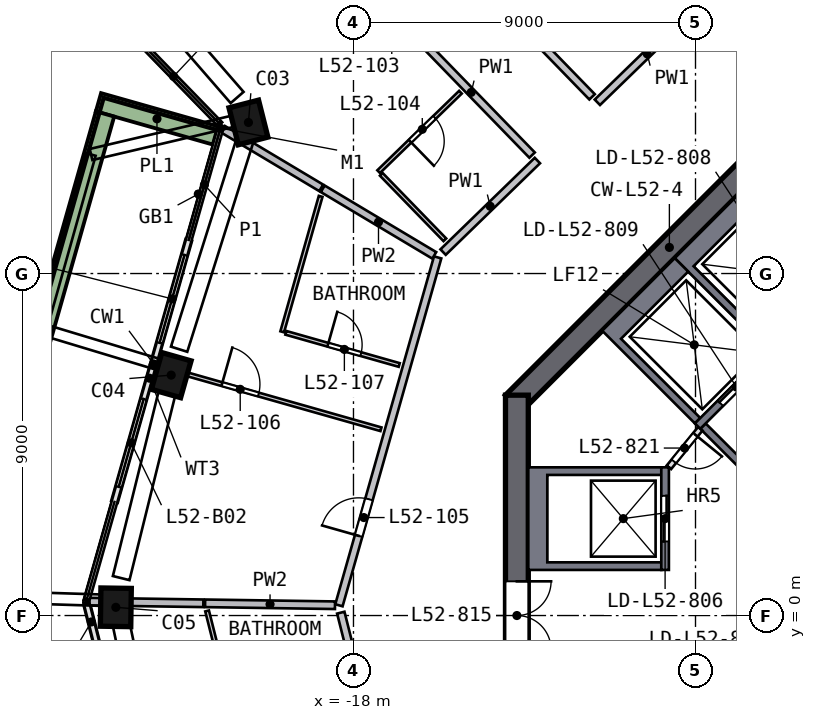
"""IFC4 building model, lengths in metres.
Left out: names, types, materials, properties, quantities, classifications, styles, units other than length and angle.
Written with IfcOpenShell. Run it as: python <this file> out.ifc"""

import sys

from ifc_helpers import new_model, si_unit, direction, frame, frame_2d, origin, origin_2d, place, context, subcontext, project, spatial, polyline, rectangle, outline, extrude, element, fill, save


model = new_model("IFC4")
c1 = context("Model", 3, precision=1e-05, world=origin(), true_north=direction((0.0, 1.0)))
c2 = subcontext(c1, "Body", "Model", "MODEL_VIEW")
j1 = project(units=[si_unit("LENGTHUNIT", "METRE"), si_unit("PLANEANGLEUNIT", "RADIAN")], contexts=[c1])
p1 = place(None, origin())
s1 = spatial("IfcSite", under=j1, at=p1, CompositionType="ELEMENT")
p2 = place(p1, origin())
s2 = spatial("IfcBuilding", under=s1, at=p2, CompositionType="ELEMENT")
p3 = place(p2, frame((0.0, 0.0, 212.5)))
s3 = spatial("IfcBuildingStorey", under=s2, at=p3, CompositionType="ELEMENT", Elevation=212.5)
p4 = place(p3, frame((-20.69, 13.095, 0.0), z_axis=(-0.061428163, -0.098931673, 0.993196408), x_axis=(-0.250648432, 0.964717679, 0.080592581)))
e1 = element("IfcColumn", 1, at=p4, inside=s3, PredefinedType="COLUMN", context=c2, shape_type="SweptSolid", body=[
    extrude(rectangle(XDim=1.0, YDim=0.8, at=origin_2d()), origin(), (0.0, 0.0, 1.0), 3.021),
])
p5 = place(p3, frame((-22.76, 6.458, 0.0), z_axis=(-0.029838507, -0.108518363, 0.993646531), x_axis=(-0.271559126, -0.955819005, -0.112541864)))
e2 = element("IfcColumn", 2, at=p5, inside=s3, PredefinedType="COLUMN", context=c2, shape_type="SweptSolid", body=[
    extrude(rectangle(XDim=1.0, YDim=0.8, at=origin_2d()), origin(), (0.0, 0.0, 1.0), 3.019),
])
p6 = place(p3, frame((-24.252, 0.356, 0.0), z_axis=(-0.000727532, -0.115354293, 0.993324145), x_axis=(0.014697649, 0.993215879, 0.115352485)))
e3 = element("IfcColumn", 3, at=p6, inside=s3, PredefinedType="COLUMN", context=c2, shape_type="SweptSolid", body=[
    extrude(rectangle(XDim=1.0, YDim=0.8, at=origin_2d()), origin(), (0.0, 0.0, 1.0), 3.02),
])
p7 = place(p3, frame((-5.587, 13.788, 0.0), z_axis=(0.0, 0.0, 1.0), x_axis=(-0.707106781, -0.707106781, 0.0)))
e4 = element("IfcWall", 4, at=p7, inside=s3, PredefinedType="SHEAR", context=c2, shape_type="SweptSolid", body=[
    extrude(rectangle(XDim=11.598, YDim=0.6, at=frame_2d((5.799, 0.0))), origin(), (0.0, 0.0, 1.0), 3.5),
])
p8 = place(p3, frame((-13.7, 5.799, 0.0), z_axis=(0.0, 0.0, 1.0), x_axis=(0.0, -1.0, 0.0)))
e5 = element("IfcWall", 5, at=p8, inside=s3, PredefinedType="SHEAR", context=c2, shape_type="SweptSolid", body=[
    extrude(rectangle(XDim=11.598, YDim=0.6, at=frame_2d((5.799, 0.0))), origin(), (0.0, 0.0, 1.0), 3.5),
])
p9 = place(p8, frame((4.899, 0.0, 0.0)))
e6 = element("IfcOpeningElement", 6, at=p9, cuts=e5, PredefinedType="OPENING", context=c2, shape_type="SweptSolid", body=[
    extrude(rectangle(XDim=1.8, YDim=2.1, at=frame_2d((0.9, 1.05))), frame((0.0, 0.31, 0.0), z_axis=(0.0, -1.0, 0.0), x_axis=(1.0, 0.0, 0.0)), (0.0, 0.0, 1.0), 0.62),
])
p10 = place(p3, frame((-22.337, 9.872, 0.0), z_axis=(0.0, 0.0, 1.0), x_axis=(-0.272994706, -0.962015536, 0.0)))
e7 = element("IfcWall", 7, at=p10, inside=s3, PredefinedType="SOLIDWALL", context=c2, shape_type="SweptSolid", body=[
    extrude(rectangle(XDim=3.4, YDim=0.15, at=frame_2d((1.7, 0.0))), origin(), (0.0, 0.0, 1.0), 2.935),
])
p11 = place(p10, frame((0.4, 0.0, 0.0)))
e8 = element("IfcOpeningElement", 8, at=p11, cuts=e7, PredefinedType="OPENING", context=c2, shape_type="SweptSolid", body=[
    extrude(rectangle(XDim=2.4, YDim=2.4, at=frame_2d((1.2, 1.2))), frame((0.0, 0.085, 0.0), z_axis=(0.0, -1.0, 0.0), x_axis=(1.0, 0.0, 0.0)), (0.0, 0.0, 1.0), 0.17),
])
p12 = place(p3, frame((-23.265, 6.601, 0.0), z_axis=(0.0, 0.0, 1.0), x_axis=(-0.272953064, -0.962027351, 0.0)))
e9 = element("IfcWall", 9, at=p12, inside=s3, PredefinedType="SOLIDWALL", context=c2, shape_type="SweptSolid", body=[
    extrude(rectangle(XDim=3.74, YDim=0.15, at=frame_2d((1.87, 0.0))), origin(), (0.0, 0.0, 1.0), 2.935),
])
p13 = place(p12, frame((0.94, 0.0, 0.0)))
e10 = element("IfcOpeningElement", 10, at=p13, cuts=e9, PredefinedType="OPENING", context=c2, shape_type="SweptSolid", body=[
    extrude(rectangle(XDim=2.4, YDim=2.4, at=frame_2d((1.2, 1.2))), frame((0.0, 0.085, 0.0), z_axis=(0.0, -1.0, 0.0), x_axis=(1.0, 0.0, 0.0)), (0.0, 0.0, 1.0), 0.17),
])
p14 = place(p3, frame((-25.014, 0.289, 0.0), z_axis=(0.0, 0.0, 1.0), x_axis=(0.244646014, -0.969612463, 0.0)))
e11 = element("IfcWall", 11, at=p14, inside=s3, PredefinedType="SOLIDWALL", context=c2, shape_type="SweptSolid", body=[
    extrude(rectangle(XDim=3.946, YDim=0.15, at=frame_2d((1.973, 0.0))), origin(), (0.0, 0.0, 1.0), 2.935),
])
p15 = place(p14, frame((1.146, 0.0, 0.0)))
e12 = element("IfcOpeningElement", 12, at=p15, cuts=e11, PredefinedType="OPENING", context=c2, shape_type="SweptSolid", body=[
    extrude(rectangle(XDim=2.4, YDim=2.4, at=frame_2d((1.2, 1.2))), frame((0.0, 0.085, 0.0), z_axis=(0.0, -1.0, 0.0), x_axis=(1.0, 0.0, 0.0)), (0.0, 0.0, 1.0), 0.17),
])
p16 = place(p3, frame((-21.632, 12.634, 0.0), z_axis=(0.0, 0.0, 1.0), x_axis=(-0.962020571, 0.272976962, 0.0)))
e13 = element("IfcWall", 13, at=p16, inside=s3, PredefinedType="SOLIDWALL", context=c2, shape_type="SweptSolid", body=[
    extrude(rectangle(XDim=3.199, YDim=0.5, at=frame_2d((1.6, 0.0))), origin(), (0.0, 0.0, 1.0), 0.7),
])
p17 = place(p3, frame((-24.537, 13.199, 0.0), z_axis=(0.0, 0.0, 1.0), x_axis=(-0.272950348, -0.962028122, 0.0)))
e14 = element("IfcWall", 14, at=p17, inside=s3, PredefinedType="SOLIDWALL", context=c2, shape_type="SweptSolid", body=[
    extrude(rectangle(XDim=13.224, YDim=0.5, at=frame_2d((6.612, 0.0))), origin(), (0.0, 0.0, 1.0), 0.7),
])
p18 = place(p3, frame((-28.149, 0.348, 0.0), z_axis=(0.0, 0.0, 1.0), x_axis=(0.244632202, -0.969615948, 0.0)))
e15 = element("IfcWall", 15, at=p18, inside=s3, PredefinedType="SOLIDWALL", context=c2, shape_type="SweptSolid", body=[
    extrude(rectangle(XDim=13.723, YDim=0.5, at=frame_2d((6.862, 0.0))), origin(), (0.0, 0.0, 1.0), 0.7),
])
p19 = place(p3, origin())
e16 = element("IfcWall", 16, at=p19, inside=s3, PredefinedType="SOLIDWALL", context=c2, shape_type="SweptSolid", body=[
    extrude(outline(polyline([(-13.4, 3.9), (-9.9, 3.9), (-9.9, 3.7), (-12.9, 3.7), (-12.9, 1.4), (-9.9, 1.4), (-9.9, 1.2), (-13.4, 1.2), (-13.4, 3.9)])), origin(), (0.0, 0.0, 1.0), 3.0),
])
p20 = place(p3, frame((-9.8, 1.2, 0.0), z_axis=(0.0, 0.0, 1.0), x_axis=(0.0, 1.0, 0.0)))
e17 = element("IfcWall", 17, at=p20, inside=s3, PredefinedType="SOLIDWALL", context=c2, shape_type="SweptSolid", body=[
    extrude(rectangle(XDim=2.7, YDim=0.2, at=frame_2d((1.35, 0.0))), origin(), (0.0, 0.0, 1.0), 3.0),
])
p21 = place(p20, frame((0.75, 0.0, 0.0)))
e18 = element("IfcOpeningElement", 18, at=p21, cuts=e17, PredefinedType="OPENING", context=c2, shape_type="SweptSolid", body=[
    extrude(rectangle(XDim=1.2, YDim=2.1, at=frame_2d((0.6, 1.05))), frame((0.0, 0.11, 0.0), z_axis=(0.0, -1.0, 0.0), x_axis=(1.0, 0.0, 0.0)), (0.0, 0.0, 1.0), 0.22),
])
p22 = place(p3, origin())
e19 = element("IfcWall", 19, at=p22, inside=s3, PredefinedType="SOLIDWALL", context=c2, shape_type="SweptSolid", body=[
    extrude(outline(polyline([(-9.546, 9.405), (-7.495, 11.455), (-5.056, 9.016), (-5.197, 8.874), (-7.283, 10.96), (-9.051, 9.192), (-6.965, 7.106), (-7.106, 6.965), (-9.546, 9.405)])), origin(), (0.0, 0.0, 1.0), 3.0),
])
p23 = place(p3, origin())
e20 = element("IfcWall", 20, at=p23, inside=s3, PredefinedType="SOLIDWALL", context=c2, shape_type="SweptSolid", body=[
    extrude(outline(polyline([(-11.455, 7.495), (-9.546, 9.405), (-9.192, 9.051), (-10.96, 7.283), (-8.874, 5.197), (-9.016, 5.056), (-11.455, 7.495)])), origin(), (0.0, 0.0, 1.0), 3.0),
])
p24 = place(p3, frame((-7.036, 6.894, 0.0), z_axis=(0.0, 0.0, 1.0), x_axis=(-0.707106781, -0.707106781, 0.0)))
e21 = element("IfcWall", 21, at=p24, inside=s3, PredefinedType="SOLIDWALL", context=c2, shape_type="SweptSolid", body=[
    extrude(rectangle(XDim=2.7, YDim=0.2, at=frame_2d((1.35, 0.0))), origin(), (0.0, 0.0, 1.0), 3.0),
])
p25 = place(p24, frame((0.65, 0.0, 0.0)))
e22 = element("IfcOpeningElement", 22, at=p25, cuts=e21, PredefinedType="OPENING", context=c2, shape_type="SweptSolid", body=[
    extrude(rectangle(XDim=1.2, YDim=2.1, at=frame_2d((0.6, 1.05))), frame((0.0, 0.11, 0.0), z_axis=(0.0, -1.0, 0.0), x_axis=(1.0, 0.0, 0.0)), (0.0, 0.0, 1.0), 0.22),
])
p26 = place(p3, frame((-6.823, 3.005, 0.0), z_axis=(0.0, 0.0, 1.0), x_axis=(-0.707106781, 0.707106781, 0.0)))
e23 = element("IfcWall", 23, at=p26, inside=s3, PredefinedType="SOLIDWALL", context=c2, shape_type="SweptSolid", body=[
    extrude(rectangle(XDim=2.8, YDim=0.2, at=frame_2d((1.4, 0.0))), origin(), (0.0, 0.0, 1.0), 3.0),
])
p27 = place(p3, frame((-8.874, 4.914, 0.0), z_axis=(0.0, 0.0, 1.0), x_axis=(-0.631274009, -0.775559878, 0.0)))
e24 = element("IfcWall", 24, at=p27, inside=s3, PredefinedType="PARTITIONING", context=c2, shape_type="SweptSolid", body=[
    extrude(rectangle(XDim=1.308, YDim=0.15, at=frame_2d((0.654, 0.0))), origin(), (0.0, 0.0, 1.0), 3.0),
])
p28 = place(p27, frame((0.204, 0.0, 0.0)))
e25 = element("IfcOpeningElement", 25, at=p28, cuts=e24, PredefinedType="OPENING", context=c2, shape_type="SweptSolid", body=[
    extrude(rectangle(XDim=0.9, YDim=2.1, at=frame_2d((0.45, 1.05))), frame((0.0, 0.085, 0.0), z_axis=(0.0, -1.0, 0.0), x_axis=(1.0, 0.0, 0.0)), (0.0, 0.0, 1.0), 0.17),
])
p29 = place(p3, frame((-16.055, -8.958, 0.0), z_axis=(0.0, 0.0, 1.0), x_axis=(-0.244643731, 0.969613039, 0.0)))
e26 = element("IfcWall", 26, at=p29, inside=s3, PredefinedType="SOLIDWALL", context=c2, shape_type="SweptSolid", body=[
    extrude(rectangle(XDim=9.317, YDim=0.2, at=frame_2d((4.658, 0.0))), origin(), (0.0, 0.0, 1.0), 3.0),
])
p30 = place(p29, frame((1.9, 0.0, 0.0)))
e27 = element("IfcOpeningElement", 27, at=p30, cuts=e26, PredefinedType="OPENING", context=c2, shape_type="SweptSolid", body=[
    extrude(rectangle(XDim=1.0, YDim=2.1, at=frame_2d((0.5, 1.05))), frame((0.0, 0.11, 0.0), z_axis=(0.0, -1.0, 0.0), x_axis=(1.0, 0.0, 0.0)), (0.0, 0.0, 1.0), 0.22),
])
p31 = place(p3, frame((-18.383, 0.27, 0.0), z_axis=(0.0, 0.0, 1.0), x_axis=(0.272958768, 0.962025733, 0.0)))
e28 = element("IfcWall", 28, at=p31, inside=s3, PredefinedType="SOLIDWALL", context=c2, shape_type="SweptSolid", body=[
    extrude(rectangle(XDim=9.517, YDim=0.2, at=frame_2d((4.758, 0.0))), origin(), (0.0, 0.0, 1.0), 3.0),
])
p32 = place(p31, frame((1.9, 0.0, 0.0)))
e29 = element("IfcOpeningElement", 29, at=p32, cuts=e28, PredefinedType="OPENING", context=c2, shape_type="SweptSolid", body=[
    extrude(rectangle(XDim=1.0, YDim=2.1, at=frame_2d((0.5, 1.05))), frame((0.0, 0.11, 0.0), z_axis=(0.0, -1.0, 0.0), x_axis=(1.0, 0.0, 0.0)), (0.0, 0.0, 1.0), 0.22),
])
p33 = place(p3, frame((-13.3, 12.117, 0.0), z_axis=(0.0, 0.0, 1.0), x_axis=(-0.696664352, 0.717397226, 0.0)))
e30 = element("IfcWall", 30, at=p33, inside=s3, PredefinedType="SOLIDWALL", context=c2, shape_type="SweptSolid", body=[
    extrude(rectangle(XDim=9.821, YDim=0.2, at=frame_2d((4.91, 0.0))), origin(), (0.0, 0.0, 1.0), 3.0),
])
p34 = place(p33, frame((4.8, 0.0, 0.0)))
e31 = element("IfcOpeningElement", 31, at=p34, cuts=e30, PredefinedType="OPENING", context=c2, shape_type="SweptSolid", body=[
    extrude(rectangle(XDim=1.0, YDim=2.1, at=frame_2d((0.5, 1.05))), frame((0.0, 0.11, 0.0), z_axis=(0.0, -1.0, 0.0), x_axis=(1.0, 0.0, 0.0)), (0.0, 0.0, 1.0), 0.22),
])
p35 = place(p3, frame((-18.563, 20.695, 0.0), z_axis=(0.0, 0.0, 1.0), x_axis=(0.696664352, -0.717397226, 0.0)))
e32 = element("IfcWall", 32, at=p35, inside=s3, PredefinedType="SOLIDWALL", context=c2, shape_type="SweptSolid", body=[
    extrude(rectangle(XDim=9.821, YDim=0.2, at=frame_2d((4.91, 0.0))), origin(), (0.0, 0.0, 1.0), 3.0),
])
p36 = place(p35, frame((4.0, 0.0, 0.0)))
e33 = element("IfcOpeningElement", 33, at=p36, cuts=e32, PredefinedType="OPENING", context=c2, shape_type="SweptSolid", body=[
    extrude(rectangle(XDim=1.0, YDim=2.1, at=frame_2d((0.5, 1.05))), frame((0.0, 0.11, 0.0), z_axis=(0.0, -1.0, 0.0), x_axis=(1.0, 0.0, 0.0)), (0.0, 0.0, 1.0), 0.22),
])
p37 = place(p3, frame((-13.161, 11.973, 0.0), z_axis=(0.0, 0.0, 1.0), x_axis=(-0.717408406, -0.696652839, 0.0)))
e34 = element("IfcWall", 34, at=p37, inside=s3, PredefinedType="SOLIDWALL", context=c2, shape_type="SweptSolid", body=[
    extrude(rectangle(XDim=3.458, YDim=0.2, at=frame_2d((1.729, 0.0))), origin(), (0.0, 0.0, 1.0), 3.0),
])
p38 = place(p3, frame((-8.958, 16.055, 0.0), z_axis=(0.0, 0.0, 1.0), x_axis=(-0.717408019, -0.696653238, 0.0)))
e35 = element("IfcWall", 35, at=p38, inside=s3, PredefinedType="SOLIDWALL", context=c2, shape_type="SweptSolid", body=[
    extrude(rectangle(XDim=3.658, YDim=0.2, at=frame_2d((1.829, 0.0))), origin(), (0.0, 0.0, 1.0), 3.0),
])
p39 = place(p3, frame((-21.95, 0.322, 0.0), z_axis=(0.0, 0.0, 1.0), x_axis=(-0.999892341, 0.014673303, 0.0)))
e36 = element("IfcWall", 36, at=p39, inside=s3, PredefinedType="SOLIDWALL", context=c2, shape_type="SweptSolid", body=[
    extrude(rectangle(XDim=3.011, YDim=0.2, at=frame_2d((1.506, 0.0))), origin(), (0.0, 0.0, 1.0), 3.0),
])
p40 = place(p3, frame((-18.486, 0.271, 0.0), z_axis=(0.0, 0.0, 1.0), x_axis=(-0.999891762, 0.014712693, 0.0)))
e37 = element("IfcWall", 37, at=p40, inside=s3, PredefinedType="SOLIDWALL", context=c2, shape_type="SweptSolid", body=[
    extrude(rectangle(XDim=3.418, YDim=0.2, at=frame_2d((1.709, 0.0))), origin(), (0.0, 0.0, 1.0), 3.0),
])
p41 = place(p3, frame((-18.849, 11.254, 0.0), z_axis=(0.0, 0.0, 1.0), x_axis=(-0.858599774, 0.512646494, 0.0)))
e38 = element("IfcWall", 38, at=p41, inside=s3, PredefinedType="SOLIDWALL", context=c2, shape_type="SweptSolid", body=[
    extrude(rectangle(XDim=3.011, YDim=0.2, at=frame_2d((1.506, 0.0))), origin(), (0.0, 0.0, 1.0), 3.0),
])
p42 = place(p3, frame((-15.874, 9.478, 0.0), z_axis=(0.0, 0.0, 1.0), x_axis=(-0.858600029, 0.512646066, 0.0)))
e39 = element("IfcWall", 39, at=p42, inside=s3, PredefinedType="SOLIDWALL", context=c2, shape_type="SweptSolid", body=[
    extrude(rectangle(XDim=3.418, YDim=0.2, at=frame_2d((1.709, 0.0))), origin(), (0.0, 0.0, 1.0), 3.0),
])
p43 = place(p3, frame((-21.852, 0.12, 0.0), z_axis=(0.0, 0.0, 1.0), x_axis=(0.244659687, -0.969609013, 0.0)))
e40 = element("IfcWall", 40, at=p43, inside=s3, PredefinedType="PARTITIONING", context=c2, shape_type="SweptSolid", body=[
    extrude(rectangle(XDim=3.704, YDim=0.1, at=frame_2d((1.852, 0.0))), origin(), (0.0, 0.0, 1.0), 3.0),
])
p44 = place(p3, frame((-23.193, 6.58, 0.0), z_axis=(0.0, 0.0, 1.0), x_axis=(0.96203609, -0.272922263, 0.0)))
e41 = element("IfcWall", 41, at=p44, inside=s3, PredefinedType="PARTITIONING", context=c2, shape_type="SweptSolid", body=[
    extrude(rectangle(XDim=6.15, YDim=0.1, at=frame_2d((3.075, 0.0))), origin(), (0.0, 0.0, 1.0), 3.0),
])
p45 = place(p44, frame((1.8, 0.0, 0.0)))
e42 = element("IfcOpeningElement", 42, at=p45, cuts=e41, PredefinedType="OPENING", context=c2, shape_type="SweptSolid", body=[
    extrude(rectangle(XDim=1.0, YDim=2.1, at=frame_2d((0.5, 1.05))), frame((0.0, 0.06, 0.0), z_axis=(0.0, -1.0, 0.0), x_axis=(1.0, 0.0, 0.0)), (0.0, 0.0, 1.0), 0.12),
])
p46 = place(p3, frame((-18.864, 11.03, 0.0), z_axis=(0.0, 0.0, 1.0), x_axis=(-0.2729534, -0.962027256, 0.0)))
e43 = element("IfcWall", 43, at=p46, inside=s3, PredefinedType="PARTITIONING", context=c2, shape_type="SweptSolid", body=[
    extrude(rectangle(XDim=3.704, YDim=0.1, at=frame_2d((1.852, 0.0))), origin(), (0.0, 0.0, 1.0), 3.0),
])
p47 = place(p3, frame((-19.779, 7.439, 0.0), z_axis=(0.0, 0.0, 1.0), x_axis=(0.96202752, -0.272952471, 0.0)))
e44 = element("IfcWall", 44, at=p47, inside=s3, PredefinedType="PARTITIONING", context=c2, shape_type="SweptSolid", body=[
    extrude(rectangle(XDim=3.1, YDim=0.1, at=frame_2d((1.55, 0.0))), origin(), (0.0, 0.0, 1.0), 3.0),
])
p48 = place(p47, frame((1.15, 0.0, 0.0)))
e45 = element("IfcOpeningElement", 45, at=p48, cuts=e44, PredefinedType="OPENING", context=c2, shape_type="SweptSolid", body=[
    extrude(rectangle(XDim=0.9, YDim=2.1, at=frame_2d((0.45, 1.05))), frame((0.0, 0.06, 0.0), z_axis=(0.0, -1.0, 0.0), x_axis=(1.0, 0.0, 0.0)), (0.0, 0.0, 1.0), 0.12),
])
p49 = place(p3, frame((-15.596, 9.888, 0.0), z_axis=(0.0, 0.0, 1.0), x_axis=(-0.696654076, 0.717407206, 0.0)))
e46 = element("IfcWall", 46, at=p49, inside=s3, PredefinedType="PARTITIONING", context=c2, shape_type="SweptSolid", body=[
    extrude(rectangle(XDim=2.4, YDim=0.1, at=frame_2d((1.2, 0.0))), origin(), (0.0, 0.0, 1.0), 3.0),
])
p50 = place(p3, frame((-15.185, 13.771, 0.0), z_axis=(0.0, 0.0, 1.0), x_axis=(-0.717407206, -0.696654076, 0.0)))
e47 = element("IfcWall", 47, at=p50, inside=s3, PredefinedType="PARTITIONING", context=c2, shape_type="SweptSolid", body=[
    extrude(rectangle(XDim=3.0, YDim=0.1, at=frame_2d((1.5, 0.0))), origin(), (0.0, 0.0, 1.0), 3.0),
])
p51 = place(p50, frame((0.95, 0.0, 0.0)))
e48 = element("IfcOpeningElement", 48, at=p51, cuts=e47, PredefinedType="OPENING", context=c2, shape_type="SweptSolid", body=[
    extrude(rectangle(XDim=0.9, YDim=2.1, at=frame_2d((0.45, 1.05))), frame((0.0, 0.06, 0.0), z_axis=(0.0, -1.0, 0.0), x_axis=(1.0, 0.0, 0.0)), (0.0, 0.0, 1.0), 0.12),
])
p52 = place(p11, origin())
e49 = element("IfcDoor", 49, at=p52, inside=s3, OperationType="SLIDING_TO_RIGHT", PredefinedType="DOOR", context=c2, shape_type="SweptSolid", body=[
    extrude(rectangle(XDim=2.4, YDim=2.4, at=frame_2d((1.2, 1.2))), frame((0.0, 0.025, 0.0), z_axis=(0.0, -1.0, 0.0), x_axis=(1.0, 0.0, 0.0)), (0.0, 0.0, 1.0), 0.05),
])
fill(e8, e49)
p53 = place(p13, origin())
e50 = element("IfcDoor", 50, at=p53, inside=s3, OperationType="SLIDING_TO_LEFT", PredefinedType="DOOR", context=c2, shape_type="SweptSolid", body=[
    extrude(rectangle(XDim=2.4, YDim=2.4, at=frame_2d((1.2, 1.2))), frame((0.0, 0.025, 0.0), z_axis=(0.0, -1.0, 0.0), x_axis=(1.0, 0.0, 0.0)), (0.0, 0.0, 1.0), 0.05),
])
fill(e10, e50)
p54 = place(p21, origin())
e51 = element("IfcDoor", 51, at=p54, inside=s3, OperationType="DOUBLE_DOOR_SLIDING", PredefinedType="DOOR", context=c2, shape_type="SweptSolid", body=[
    extrude(rectangle(XDim=1.2, YDim=2.1, at=frame_2d((0.6, 1.05))), frame((0.0, 0.025, 0.0), z_axis=(0.0, -1.0, 0.0), x_axis=(1.0, 0.0, 0.0)), (0.0, 0.0, 1.0), 0.05),
])
fill(e18, e51)
p55 = place(p25, origin())
e52 = element("IfcDoor", 52, at=p55, inside=s3, OperationType="DOUBLE_DOOR_SLIDING", PredefinedType="DOOR", context=c2, shape_type="SweptSolid", body=[
    extrude(rectangle(XDim=1.2, YDim=2.1, at=frame_2d((0.6, 1.05))), frame((0.0, 0.025, 0.0), z_axis=(0.0, -1.0, 0.0), x_axis=(1.0, 0.0, 0.0)), (0.0, 0.0, 1.0), 0.05),
])
fill(e22, e52)
p56 = place(p9, origin())
e53 = element("IfcDoor", 53, at=p56, inside=s3, OperationType="DOUBLE_DOOR_SINGLE_SWING", PredefinedType="DOOR", context=c2, shape_type="SweptSolid", body=[
    extrude(rectangle(XDim=1.8, YDim=2.1, at=frame_2d((0.9, 1.05))), frame((0.0, 0.025, 0.0), z_axis=(0.0, -1.0, 0.0), x_axis=(1.0, 0.0, 0.0)), (0.0, 0.0, 1.0), 0.05),
])
fill(e6, e53)
p57 = place(p28, origin())
e54 = element("IfcDoor", 54, at=p57, inside=s3, OperationType="SINGLE_SWING_LEFT", PredefinedType="DOOR", context=c2, shape_type="SweptSolid", body=[
    extrude(rectangle(XDim=0.9, YDim=2.1, at=frame_2d((0.45, 1.05))), frame((0.0, 0.025, 0.0), z_axis=(0.0, -1.0, 0.0), x_axis=(1.0, 0.0, 0.0)), (0.0, 0.0, 1.0), 0.05),
])
fill(e25, e54)
p58 = place(p51, origin())
e55 = element("IfcDoor", 55, at=p58, inside=s3, OperationType="SINGLE_SWING_RIGHT", PredefinedType="DOOR", context=c2, shape_type="SweptSolid", body=[
    extrude(rectangle(XDim=0.9, YDim=2.1, at=frame_2d((0.45, 1.05))), frame((0.0, 0.025, 0.0), z_axis=(0.0, -1.0, 0.0), x_axis=(1.0, 0.0, 0.0)), (0.0, 0.0, 1.0), 0.05),
])
fill(e48, e55)
p59 = place(p32, origin())
e56 = element("IfcDoor", 56, at=p59, inside=s3, OperationType="SINGLE_SWING_LEFT", PredefinedType="DOOR", context=c2, shape_type="SweptSolid", body=[
    extrude(rectangle(XDim=1.0, YDim=2.1, at=frame_2d((0.5, 1.05))), frame((0.0, 0.025, 0.0), z_axis=(0.0, -1.0, 0.0), x_axis=(1.0, 0.0, 0.0)), (0.0, 0.0, 1.0), 0.05),
])
fill(e29, e56)
p60 = place(p45, origin())
e57 = element("IfcDoor", 57, at=p60, inside=s3, OperationType="SINGLE_SWING_LEFT", PredefinedType="DOOR", context=c2, shape_type="SweptSolid", body=[
    extrude(rectangle(XDim=1.0, YDim=2.1, at=frame_2d((0.5, 1.05))), frame((0.0, 0.025, 0.0), z_axis=(0.0, -1.0, 0.0), x_axis=(1.0, 0.0, 0.0)), (0.0, 0.0, 1.0), 0.05),
])
fill(e42, e57)
p61 = place(p48, origin())
e58 = element("IfcDoor", 58, at=p61, inside=s3, OperationType="SINGLE_SWING_LEFT", PredefinedType="DOOR", context=c2, shape_type="SweptSolid", body=[
    extrude(rectangle(XDim=0.9, YDim=2.1, at=frame_2d((0.45, 1.05))), frame((0.0, 0.025, 0.0), z_axis=(0.0, -1.0, 0.0), x_axis=(1.0, 0.0, 0.0)), (0.0, 0.0, 1.0), 0.05),
])
fill(e45, e58)
save(model, sys.argv[1])
